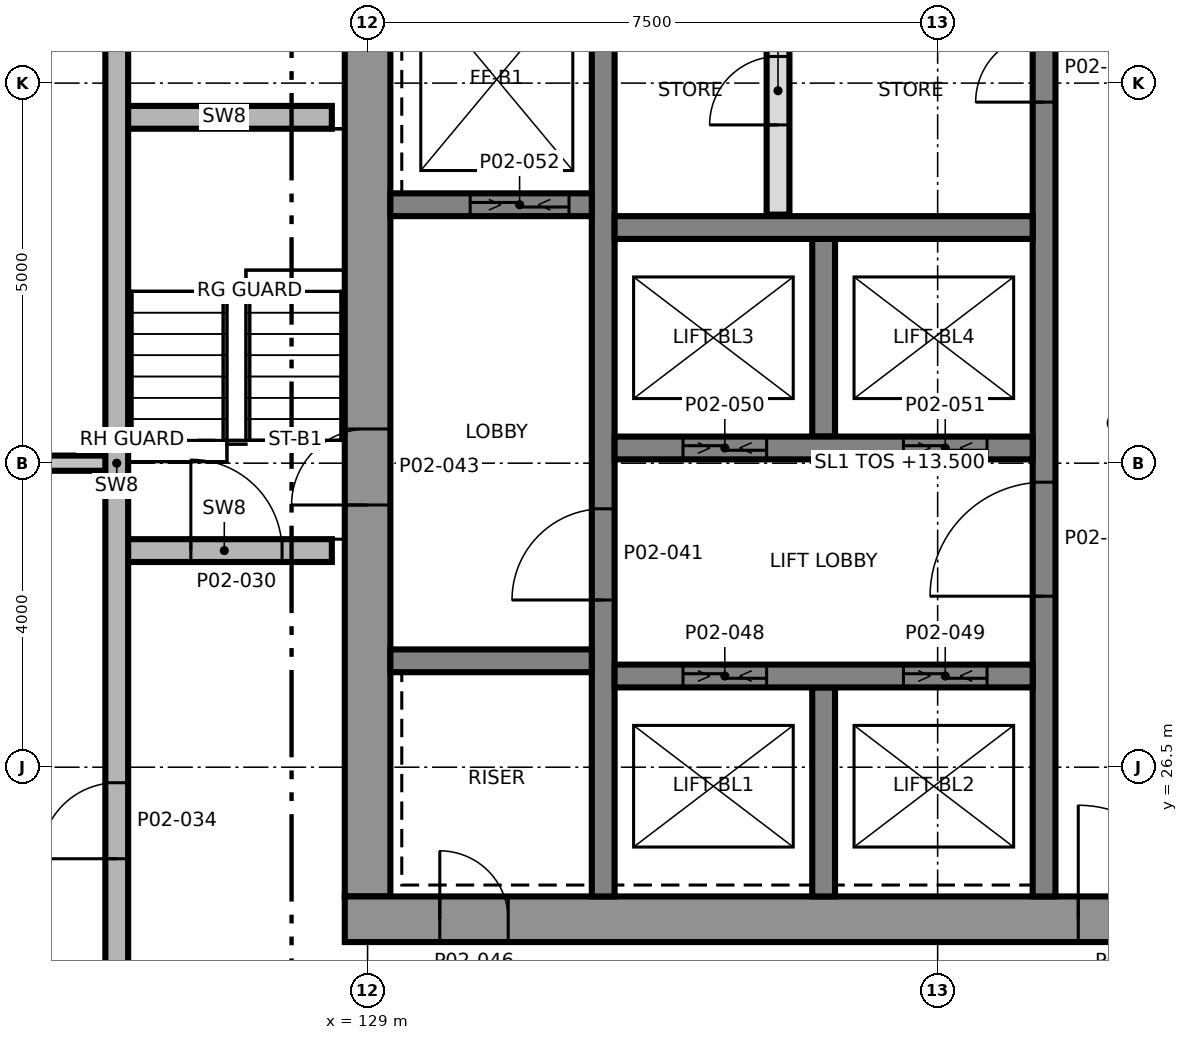
"""IFC4 building model, lengths in metres.
Left out: names, types, materials, properties, quantities, classifications, styles, units other than length and angle.
Written with IfcOpenShell. Run it as: python <this file> out.ifc"""

import sys

from ifc_helpers import new_model, si_unit, direction, frame, frame_2d, origin, place, context, subcontext, project, spatial, rectangle, extrude, element, fill, save


model = new_model("IFC4")
c1 = context("Model", 3, precision=1e-05, world=origin(), true_north=direction((0.0, 1.0)))
c2 = subcontext(c1, "Body", "Model", "MODEL_VIEW")
j1 = project(units=[si_unit("LENGTHUNIT", "METRE"), si_unit("PLANEANGLEUNIT", "RADIAN")], contexts=[c1])
p1 = place(None, origin())
s1 = spatial("IfcSite", under=j1, at=p1, CompositionType="ELEMENT")
p2 = place(p1, origin())
s2 = spatial("IfcBuilding", under=s1, at=p2, CompositionType="ELEMENT")
p3 = place(p2, frame((0.0, 0.0, 13.5)))
s3 = spatial("IfcBuildingStorey", under=s2, at=p3, CompositionType="ELEMENT", Elevation=13.5)
p4 = place(p3, frame((129.0, 24.8, 0.0), z_axis=(0.0, 0.0, 1.0), x_axis=(0.0, 1.0, 0.0)))
e1 = element("IfcWall", 1, at=p4, inside=s3, PredefinedType="SHEAR", context=c2, shape_type="SweptSolid", body=[
    extrude(rectangle(XDim=12.4, YDim=0.6, at=frame_2d((6.2, 0.0))), origin(), (0.0, 0.0, 1.0), 5.0),
])
p5 = place(p4, frame((5.15, 0.0, 0.0)))
e2 = element("IfcOpeningElement", 2, at=p5, cuts=e1, PredefinedType="OPENING", context=c2, shape_type="SweptSolid", body=[
    extrude(rectangle(XDim=1.0, YDim=2.1, at=frame_2d((0.5, 1.05))), frame((0.0, 0.31, 0.0), z_axis=(0.0, -1.0, 0.0), x_axis=(1.0, 0.0, 0.0)), (0.0, 0.0, 1.0), 0.62),
])
p6 = place(p3, frame((128.7, 24.5, 0.0), z_axis=(0.0, 0.0, 1.0), x_axis=(1.0, 0.0, 0.0)))
e3 = element("IfcWall", 3, at=p6, inside=s3, PredefinedType="SHEAR", context=c2, shape_type="SweptSolid", body=[
    extrude(rectangle(XDim=15.0, YDim=0.6, at=frame_2d((7.5, 0.0))), origin(), (0.0, 0.0, 1.0), 5.0),
])
p7 = place(p6, frame((9.65, 0.0, 0.0)))
e4 = element("IfcOpeningElement", 4, at=p7, cuts=e3, PredefinedType="OPENING", context=c2, shape_type="SweptSolid", body=[
    extrude(rectangle(XDim=1.5, YDim=2.1, at=frame_2d((0.75, 1.05))), frame((0.0, 0.31, 0.0), z_axis=(0.0, -1.0, 0.0), x_axis=(1.0, 0.0, 0.0)), (0.0, 0.0, 1.0), 0.62),
])
p8 = place(p6, frame((1.25, 0.0, 0.0)))
e5 = element("IfcOpeningElement", 5, at=p8, cuts=e3, PredefinedType="OPENING", context=c2, shape_type="SweptSolid", body=[
    extrude(rectangle(XDim=0.9, YDim=2.1, at=frame_2d((0.45, 1.05))), frame((0.0, 0.31, 0.0), z_axis=(0.0, -1.0, 0.0), x_axis=(1.0, 0.0, 0.0)), (0.0, 0.0, 1.0), 0.62),
])
p9 = place(p3, frame((132.1, 24.8, 0.0), z_axis=(0.0, 0.0, 1.0), x_axis=(0.0, 1.0, 0.0)))
e6 = element("IfcWall", 6, at=p9, inside=s3, PredefinedType="SHEAR", context=c2, shape_type="SweptSolid", body=[
    extrude(rectangle(XDim=12.4, YDim=0.3, at=frame_2d((6.2, 0.0))), origin(), (0.0, 0.0, 1.0), 5.0),
])
p10 = place(p9, frame((3.9, 0.0, 0.0)))
e7 = element("IfcOpeningElement", 7, at=p10, cuts=e6, PredefinedType="OPENING", context=c2, shape_type="SweptSolid", body=[
    extrude(rectangle(XDim=1.2, YDim=2.1, at=frame_2d((0.6, 1.05))), frame((0.0, 0.16, 0.0), z_axis=(0.0, -1.0, 0.0), x_axis=(1.0, 0.0, 0.0)), (0.0, 0.0, 1.0), 0.32),
])
p11 = place(p3, frame((137.9, 24.8, 0.0), z_axis=(0.0, 0.0, 1.0), x_axis=(0.0, 1.0, 0.0)))
e8 = element("IfcWall", 8, at=p11, inside=s3, PredefinedType="SHEAR", context=c2, shape_type="SweptSolid", body=[
    extrude(rectangle(XDim=12.4, YDim=0.3, at=frame_2d((6.2, 0.0))), origin(), (0.0, 0.0, 1.0), 5.0),
])
p12 = place(p11, frame((3.95, 0.0, 0.0)))
e9 = element("IfcOpeningElement", 9, at=p12, cuts=e8, PredefinedType="OPENING", context=c2, shape_type="SweptSolid", body=[
    extrude(rectangle(XDim=1.5, YDim=2.1, at=frame_2d((0.75, 1.05))), frame((0.0, 0.16, 0.0), z_axis=(0.0, -1.0, 0.0), x_axis=(1.0, 0.0, 0.0)), (0.0, 0.0, 1.0), 0.32),
])
p13 = place(p11, frame((10.45, 0.0, 0.0)))
e10 = element("IfcOpeningElement", 10, at=p13, cuts=e8, PredefinedType="OPENING", context=c2, shape_type="SweptSolid", body=[
    extrude(rectangle(XDim=0.9, YDim=2.1, at=frame_2d((0.45, 1.05))), frame((0.0, 0.16, 0.0), z_axis=(0.0, -1.0, 0.0), x_axis=(1.0, 0.0, 0.0)), (0.0, 0.0, 1.0), 0.32),
])
p14 = place(p3, frame((135.0, 24.8, 0.0), z_axis=(0.0, 0.0, 1.0), x_axis=(0.0, 1.0, 0.0)))
e11 = element("IfcWall", 11, at=p14, inside=s3, PredefinedType="SHEAR", context=c2, shape_type="SweptSolid", body=[
    extrude(rectangle(XDim=2.75, YDim=0.3, at=frame_2d((1.375, 0.0))), origin(), (0.0, 0.0, 1.0), 5.0),
])
p15 = place(p3, frame((135.0, 30.85, 0.0), z_axis=(0.0, 0.0, 1.0), x_axis=(0.0, 1.0, 0.0)))
e12 = element("IfcWall", 12, at=p15, inside=s3, PredefinedType="SHEAR", context=c2, shape_type="SweptSolid", body=[
    extrude(rectangle(XDim=2.6, YDim=0.3, at=frame_2d((1.3, 0.0))), origin(), (0.0, 0.0, 1.0), 5.0),
])
p16 = place(p3, frame((132.25, 27.7, 0.0), z_axis=(0.0, 0.0, 1.0), x_axis=(1.0, 0.0, 0.0)))
e13 = element("IfcWall", 13, at=p16, inside=s3, PredefinedType="SHEAR", context=c2, shape_type="SweptSolid", body=[
    extrude(rectangle(XDim=5.5, YDim=0.3, at=frame_2d((2.75, 0.0))), origin(), (0.0, 0.0, 1.0), 5.0),
])
p17 = place(p16, frame((0.9, 0.0, 0.0)))
e14 = element("IfcOpeningElement", 14, at=p17, cuts=e13, PredefinedType="OPENING", context=c2, shape_type="SweptSolid", body=[
    extrude(rectangle(XDim=1.1, YDim=2.4, at=frame_2d((0.55, 1.2))), frame((0.0, 0.16, 0.0), z_axis=(0.0, -1.0, 0.0), x_axis=(1.0, 0.0, 0.0)), (0.0, 0.0, 1.0), 0.32),
])
p18 = place(p16, frame((3.8, 0.0, 0.0)))
e15 = element("IfcOpeningElement", 15, at=p18, cuts=e13, PredefinedType="OPENING", context=c2, shape_type="SweptSolid", body=[
    extrude(rectangle(XDim=1.1, YDim=2.4, at=frame_2d((0.55, 1.2))), frame((0.0, 0.16, 0.0), z_axis=(0.0, -1.0, 0.0), x_axis=(1.0, 0.0, 0.0)), (0.0, 0.0, 1.0), 0.32),
])
p19 = place(p3, frame((132.25, 30.7, 0.0), z_axis=(0.0, 0.0, 1.0), x_axis=(1.0, 0.0, 0.0)))
e16 = element("IfcWall", 16, at=p19, inside=s3, PredefinedType="SHEAR", context=c2, shape_type="SweptSolid", body=[
    extrude(rectangle(XDim=5.5, YDim=0.3, at=frame_2d((2.75, 0.0))), origin(), (0.0, 0.0, 1.0), 5.0),
])
p20 = place(p19, frame((0.9, 0.0, 0.0)))
e17 = element("IfcOpeningElement", 17, at=p20, cuts=e16, PredefinedType="OPENING", context=c2, shape_type="SweptSolid", body=[
    extrude(rectangle(XDim=1.1, YDim=2.4, at=frame_2d((0.55, 1.2))), frame((0.0, 0.16, 0.0), z_axis=(0.0, -1.0, 0.0), x_axis=(1.0, 0.0, 0.0)), (0.0, 0.0, 1.0), 0.32),
])
p21 = place(p19, frame((3.8, 0.0, 0.0)))
e18 = element("IfcOpeningElement", 18, at=p21, cuts=e16, PredefinedType="OPENING", context=c2, shape_type="SweptSolid", body=[
    extrude(rectangle(XDim=1.1, YDim=2.4, at=frame_2d((0.55, 1.2))), frame((0.0, 0.16, 0.0), z_axis=(0.0, -1.0, 0.0), x_axis=(1.0, 0.0, 0.0)), (0.0, 0.0, 1.0), 0.32),
])
p22 = place(p3, frame((132.25, 33.6, 0.0), z_axis=(0.0, 0.0, 1.0), x_axis=(1.0, 0.0, 0.0)))
e19 = element("IfcWall", 19, at=p22, inside=s3, PredefinedType="SHEAR", context=c2, shape_type="SweptSolid", body=[
    extrude(rectangle(XDim=5.5, YDim=0.3, at=frame_2d((2.75, 0.0))), origin(), (0.0, 0.0, 1.0), 5.0),
])
p23 = place(p3, frame((129.3, 27.9, 0.0), z_axis=(0.0, 0.0, 1.0), x_axis=(1.0, 0.0, 0.0)))
e20 = element("IfcWall", 20, at=p23, inside=s3, PredefinedType="SHEAR", context=c2, shape_type="SweptSolid", body=[
    extrude(rectangle(XDim=2.65, YDim=0.3, at=frame_2d((1.325, 0.0))), origin(), (0.0, 0.0, 1.0), 5.0),
])
p24 = place(p3, frame((129.3, 33.9, 0.0), z_axis=(0.0, 0.0, 1.0), x_axis=(1.0, 0.0, 0.0)))
e21 = element("IfcWall", 21, at=p24, inside=s3, PredefinedType="SHEAR", context=c2, shape_type="SweptSolid", body=[
    extrude(rectangle(XDim=2.65, YDim=0.3, at=frame_2d((1.325, 0.0))), origin(), (0.0, 0.0, 1.0), 5.0),
])
p25 = place(p24, frame((1.05, 0.0, 0.0)))
e22 = element("IfcOpeningElement", 22, at=p25, cuts=e21, PredefinedType="OPENING", context=c2, shape_type="SweptSolid", body=[
    extrude(rectangle(XDim=1.3, YDim=2.4, at=frame_2d((0.65, 1.2))), frame((0.0, 0.16, 0.0), z_axis=(0.0, -1.0, 0.0), x_axis=(1.0, 0.0, 0.0)), (0.0, 0.0, 1.0), 0.32),
])
p26 = place(p3, frame((125.7, 29.35, 0.0), z_axis=(0.0, 0.0, 1.0), x_axis=(1.0, 0.0, 0.0)))
e23 = element("IfcWall", 23, at=p26, inside=s3, PredefinedType="SHEAR", context=c2, shape_type="SweptSolid", body=[
    extrude(rectangle(XDim=2.83, YDim=0.3, at=frame_2d((1.415, 0.0))), origin(), (0.0, 0.0, 1.0), 4.7),
])
p27 = place(p26, frame((0.975, 0.0, 0.0)))
e24 = element("IfcOpeningElement", 24, at=p27, cuts=e23, PredefinedType="OPENING", context=c2, shape_type="SweptSolid", body=[
    extrude(rectangle(XDim=1.2, YDim=2.1, at=frame_2d((0.6, 1.05))), frame((0.0, 0.16, 0.0), z_axis=(0.0, -1.0, 0.0), x_axis=(1.0, 0.0, 0.0)), (0.0, 0.0, 1.0), 0.32),
])
p28 = place(p3, frame((112.07, 30.5, 0.0), z_axis=(0.0, 0.0, 1.0), x_axis=(1.0, 0.0, 0.0)))
e25 = element("IfcWall", 25, at=p28, inside=s3, PredefinedType="PARTITIONING", context=c2, shape_type="SweptSolid", body=[
    extrude(rectangle(XDim=13.68, YDim=0.2, at=frame_2d((6.84, 0.0))), origin(), (0.0, 0.0, 1.0), 4.7),
])
p29 = place(p3, frame((125.7, 35.05, 0.0), z_axis=(0.0, 0.0, 1.0), x_axis=(1.0, 0.0, 0.0)))
e26 = element("IfcWall", 26, at=p29, inside=s3, PredefinedType="SHEAR", context=c2, shape_type="SweptSolid", body=[
    extrude(rectangle(XDim=2.83, YDim=0.3, at=frame_2d((1.415, 0.0))), origin(), (0.0, 0.0, 1.0), 4.7),
])
p30 = place(p3, frame((125.7, 11.07, 0.0), z_axis=(0.0, 0.0, 1.0), x_axis=(0.0, 1.0, 0.0)))
e27 = element("IfcWall", 27, at=p30, inside=s3, PredefinedType="SHEAR", context=c2, shape_type="SweptSolid", body=[
    extrude(rectangle(XDim=38.86, YDim=0.3, at=frame_2d((19.43, 0.0))), origin(), (0.0, 0.0, 1.0), 4.7),
])
p31 = place(p30, frame((14.226, 0.0, 0.0)))
e28 = element("IfcOpeningElement", 28, at=p31, cuts=e27, PredefinedType="OPENING", context=c2, shape_type="SweptSolid", body=[
    extrude(rectangle(XDim=1.0, YDim=2.1, at=frame_2d((0.5, 1.05))), frame((0.0, 0.16, 0.0), z_axis=(0.0, -1.0, 0.0), x_axis=(1.0, 0.0, 0.0)), (0.0, 0.0, 1.0), 0.32),
])
p32 = place(p30, frame((25.835, 0.0, 0.0)))
e29 = element("IfcOpeningElement", 29, at=p32, cuts=e27, PredefinedType="OPENING", context=c2, shape_type="SweptSolid", body=[
    extrude(rectangle(XDim=1.0, YDim=2.1, at=frame_2d((0.5, 1.05))), frame((0.0, 0.16, 0.0), z_axis=(0.0, -1.0, 0.0), x_axis=(1.0, 0.0, 0.0)), (0.0, 0.0, 1.0), 0.32),
])
p33 = place(p3, frame((134.4, 33.77, 0.0), z_axis=(0.0, 0.0, 1.0), x_axis=(0.0, 1.0, 0.0)))
e30 = element("IfcWall", 30, at=p33, inside=s3, PredefinedType="PARTITIONING", context=c2, shape_type="SweptSolid", body=[
    extrude(rectangle(XDim=3.26, YDim=0.3, at=frame_2d((1.63, 0.0))), origin(), (0.0, 0.0, 1.0), 4.7),
])
p34 = place(p33, frame((1.18, 0.0, 0.0)))
e31 = element("IfcOpeningElement", 31, at=p34, cuts=e30, PredefinedType="OPENING", context=c2, shape_type="SweptSolid", body=[
    extrude(rectangle(XDim=0.9, YDim=2.1, at=frame_2d((0.45, 1.05))), frame((0.0, 0.16, 0.0), z_axis=(0.0, -1.0, 0.0), x_axis=(1.0, 0.0, 0.0)), (0.0, 0.0, 1.0), 0.32),
])
p35 = place(p27, origin())
e32 = element("IfcDoor", 32, at=p35, inside=s3, OperationType="SINGLE_SWING_RIGHT", PredefinedType="DOOR", context=c2, shape_type="SweptSolid", body=[
    extrude(rectangle(XDim=1.2, YDim=2.1, at=frame_2d((0.6, 1.05))), frame((0.0, 0.025, 0.0), z_axis=(0.0, -1.0, 0.0), x_axis=(1.0, 0.0, 0.0)), (0.0, 0.0, 1.0), 0.05),
])
fill(e24, e32)
p36 = place(p34, origin())
e33 = element("IfcDoor", 33, at=p36, inside=s3, OperationType="SINGLE_SWING_RIGHT", PredefinedType="DOOR", context=c2, shape_type="SweptSolid", body=[
    extrude(rectangle(XDim=0.9, YDim=2.1, at=frame_2d((0.45, 1.05))), frame((0.0, 0.025, 0.0), z_axis=(0.0, -1.0, 0.0), x_axis=(1.0, 0.0, 0.0)), (0.0, 0.0, 1.0), 0.05),
])
fill(e31, e33)
p37 = place(p31, origin())
e34 = element("IfcDoor", 34, at=p37, inside=s3, OperationType="SINGLE_SWING_RIGHT", PredefinedType="DOOR", context=c2, shape_type="SweptSolid", body=[
    extrude(rectangle(XDim=1.0, YDim=2.1, at=frame_2d((0.5, 1.05))), frame((0.0, 0.025, 0.0), z_axis=(0.0, -1.0, 0.0), x_axis=(1.0, 0.0, 0.0)), (0.0, 0.0, 1.0), 0.05),
])
fill(e28, e34)
p38 = place(p12, origin())
e35 = element("IfcDoor", 35, at=p38, inside=s3, OperationType="SINGLE_SWING_RIGHT", PredefinedType="DOOR", context=c2, shape_type="SweptSolid", body=[
    extrude(rectangle(XDim=1.5, YDim=2.1, at=frame_2d((0.75, 1.05))), frame((0.0, 0.025, 0.0), z_axis=(0.0, -1.0, 0.0), x_axis=(1.0, 0.0, 0.0)), (0.0, 0.0, 1.0), 0.05),
])
fill(e9, e35)
p39 = place(p10, origin())
e36 = element("IfcDoor", 36, at=p39, inside=s3, OperationType="SINGLE_SWING_LEFT", PredefinedType="DOOR", context=c2, shape_type="SweptSolid", body=[
    extrude(rectangle(XDim=1.2, YDim=2.1, at=frame_2d((0.6, 1.05))), frame((0.0, 0.025, 0.0), z_axis=(0.0, -1.0, 0.0), x_axis=(1.0, 0.0, 0.0)), (0.0, 0.0, 1.0), 0.05),
])
fill(e7, e36)
p40 = place(p5, origin())
e37 = element("IfcDoor", 37, at=p40, inside=s3, OperationType="SINGLE_SWING_RIGHT", PredefinedType="DOOR", context=c2, shape_type="SweptSolid", body=[
    extrude(rectangle(XDim=1.0, YDim=2.1, at=frame_2d((0.5, 1.05))), frame((0.0, 0.025, 0.0), z_axis=(0.0, -1.0, 0.0), x_axis=(1.0, 0.0, 0.0)), (0.0, 0.0, 1.0), 0.05),
])
fill(e2, e37)
p41 = place(p7, origin())
e38 = element("IfcDoor", 38, at=p41, inside=s3, OperationType="SINGLE_SWING_LEFT", PredefinedType="DOOR", context=c2, shape_type="SweptSolid", body=[
    extrude(rectangle(XDim=1.5, YDim=2.1, at=frame_2d((0.75, 1.05))), frame((0.0, 0.025, 0.0), z_axis=(0.0, -1.0, 0.0), x_axis=(1.0, 0.0, 0.0)), (0.0, 0.0, 1.0), 0.05),
])
fill(e4, e38)
p42 = place(p8, origin())
e39 = element("IfcDoor", 39, at=p42, inside=s3, OperationType="SINGLE_SWING_LEFT", PredefinedType="DOOR", context=c2, shape_type="SweptSolid", body=[
    extrude(rectangle(XDim=0.9, YDim=2.1, at=frame_2d((0.45, 1.05))), frame((0.0, 0.025, 0.0), z_axis=(0.0, -1.0, 0.0), x_axis=(1.0, 0.0, 0.0)), (0.0, 0.0, 1.0), 0.05),
])
fill(e5, e39)
p43 = place(p17, origin())
e40 = element("IfcDoor", 40, at=p43, inside=s3, OperationType="SLIDING_TO_LEFT", PredefinedType="DOOR", context=c2, shape_type="SweptSolid", body=[
    extrude(rectangle(XDim=1.1, YDim=2.4, at=frame_2d((0.55, 1.2))), frame((0.0, 0.025, 0.0), z_axis=(0.0, -1.0, 0.0), x_axis=(1.0, 0.0, 0.0)), (0.0, 0.0, 1.0), 0.05),
])
fill(e14, e40)
p44 = place(p18, origin())
e41 = element("IfcDoor", 41, at=p44, inside=s3, OperationType="SLIDING_TO_LEFT", PredefinedType="DOOR", context=c2, shape_type="SweptSolid", body=[
    extrude(rectangle(XDim=1.1, YDim=2.4, at=frame_2d((0.55, 1.2))), frame((0.0, 0.025, 0.0), z_axis=(0.0, -1.0, 0.0), x_axis=(1.0, 0.0, 0.0)), (0.0, 0.0, 1.0), 0.05),
])
fill(e15, e41)
p45 = place(p20, origin())
e42 = element("IfcDoor", 42, at=p45, inside=s3, OperationType="SLIDING_TO_LEFT", PredefinedType="DOOR", context=c2, shape_type="SweptSolid", body=[
    extrude(rectangle(XDim=1.1, YDim=2.4, at=frame_2d((0.55, 1.2))), frame((0.0, 0.025, 0.0), z_axis=(0.0, -1.0, 0.0), x_axis=(1.0, 0.0, 0.0)), (0.0, 0.0, 1.0), 0.05),
])
fill(e17, e42)
p46 = place(p21, origin())
e43 = element("IfcDoor", 43, at=p46, inside=s3, OperationType="SLIDING_TO_LEFT", PredefinedType="DOOR", context=c2, shape_type="SweptSolid", body=[
    extrude(rectangle(XDim=1.1, YDim=2.4, at=frame_2d((0.55, 1.2))), frame((0.0, 0.025, 0.0), z_axis=(0.0, -1.0, 0.0), x_axis=(1.0, 0.0, 0.0)), (0.0, 0.0, 1.0), 0.05),
])
fill(e18, e43)
p47 = place(p25, origin())
e44 = element("IfcDoor", 44, at=p47, inside=s3, OperationType="SLIDING_TO_LEFT", PredefinedType="DOOR", context=c2, shape_type="SweptSolid", body=[
    extrude(rectangle(XDim=1.3, YDim=2.4, at=frame_2d((0.65, 1.2))), frame((0.0, 0.025, 0.0), z_axis=(0.0, -1.0, 0.0), x_axis=(1.0, 0.0, 0.0)), (0.0, 0.0, 1.0), 0.05),
])
fill(e22, e44)
p48 = place(p13, origin())
e45 = element("IfcDoor", 45, at=p48, inside=s3, OperationType="SINGLE_SWING_RIGHT", PredefinedType="DOOR", context=c2, shape_type="SweptSolid", body=[
    extrude(rectangle(XDim=0.9, YDim=2.1, at=frame_2d((0.45, 1.05))), frame((0.0, 0.025, 0.0), z_axis=(0.0, -1.0, 0.0), x_axis=(1.0, 0.0, 0.0)), (0.0, 0.0, 1.0), 0.05),
])
fill(e10, e45)
save(model, sys.argv[1])
